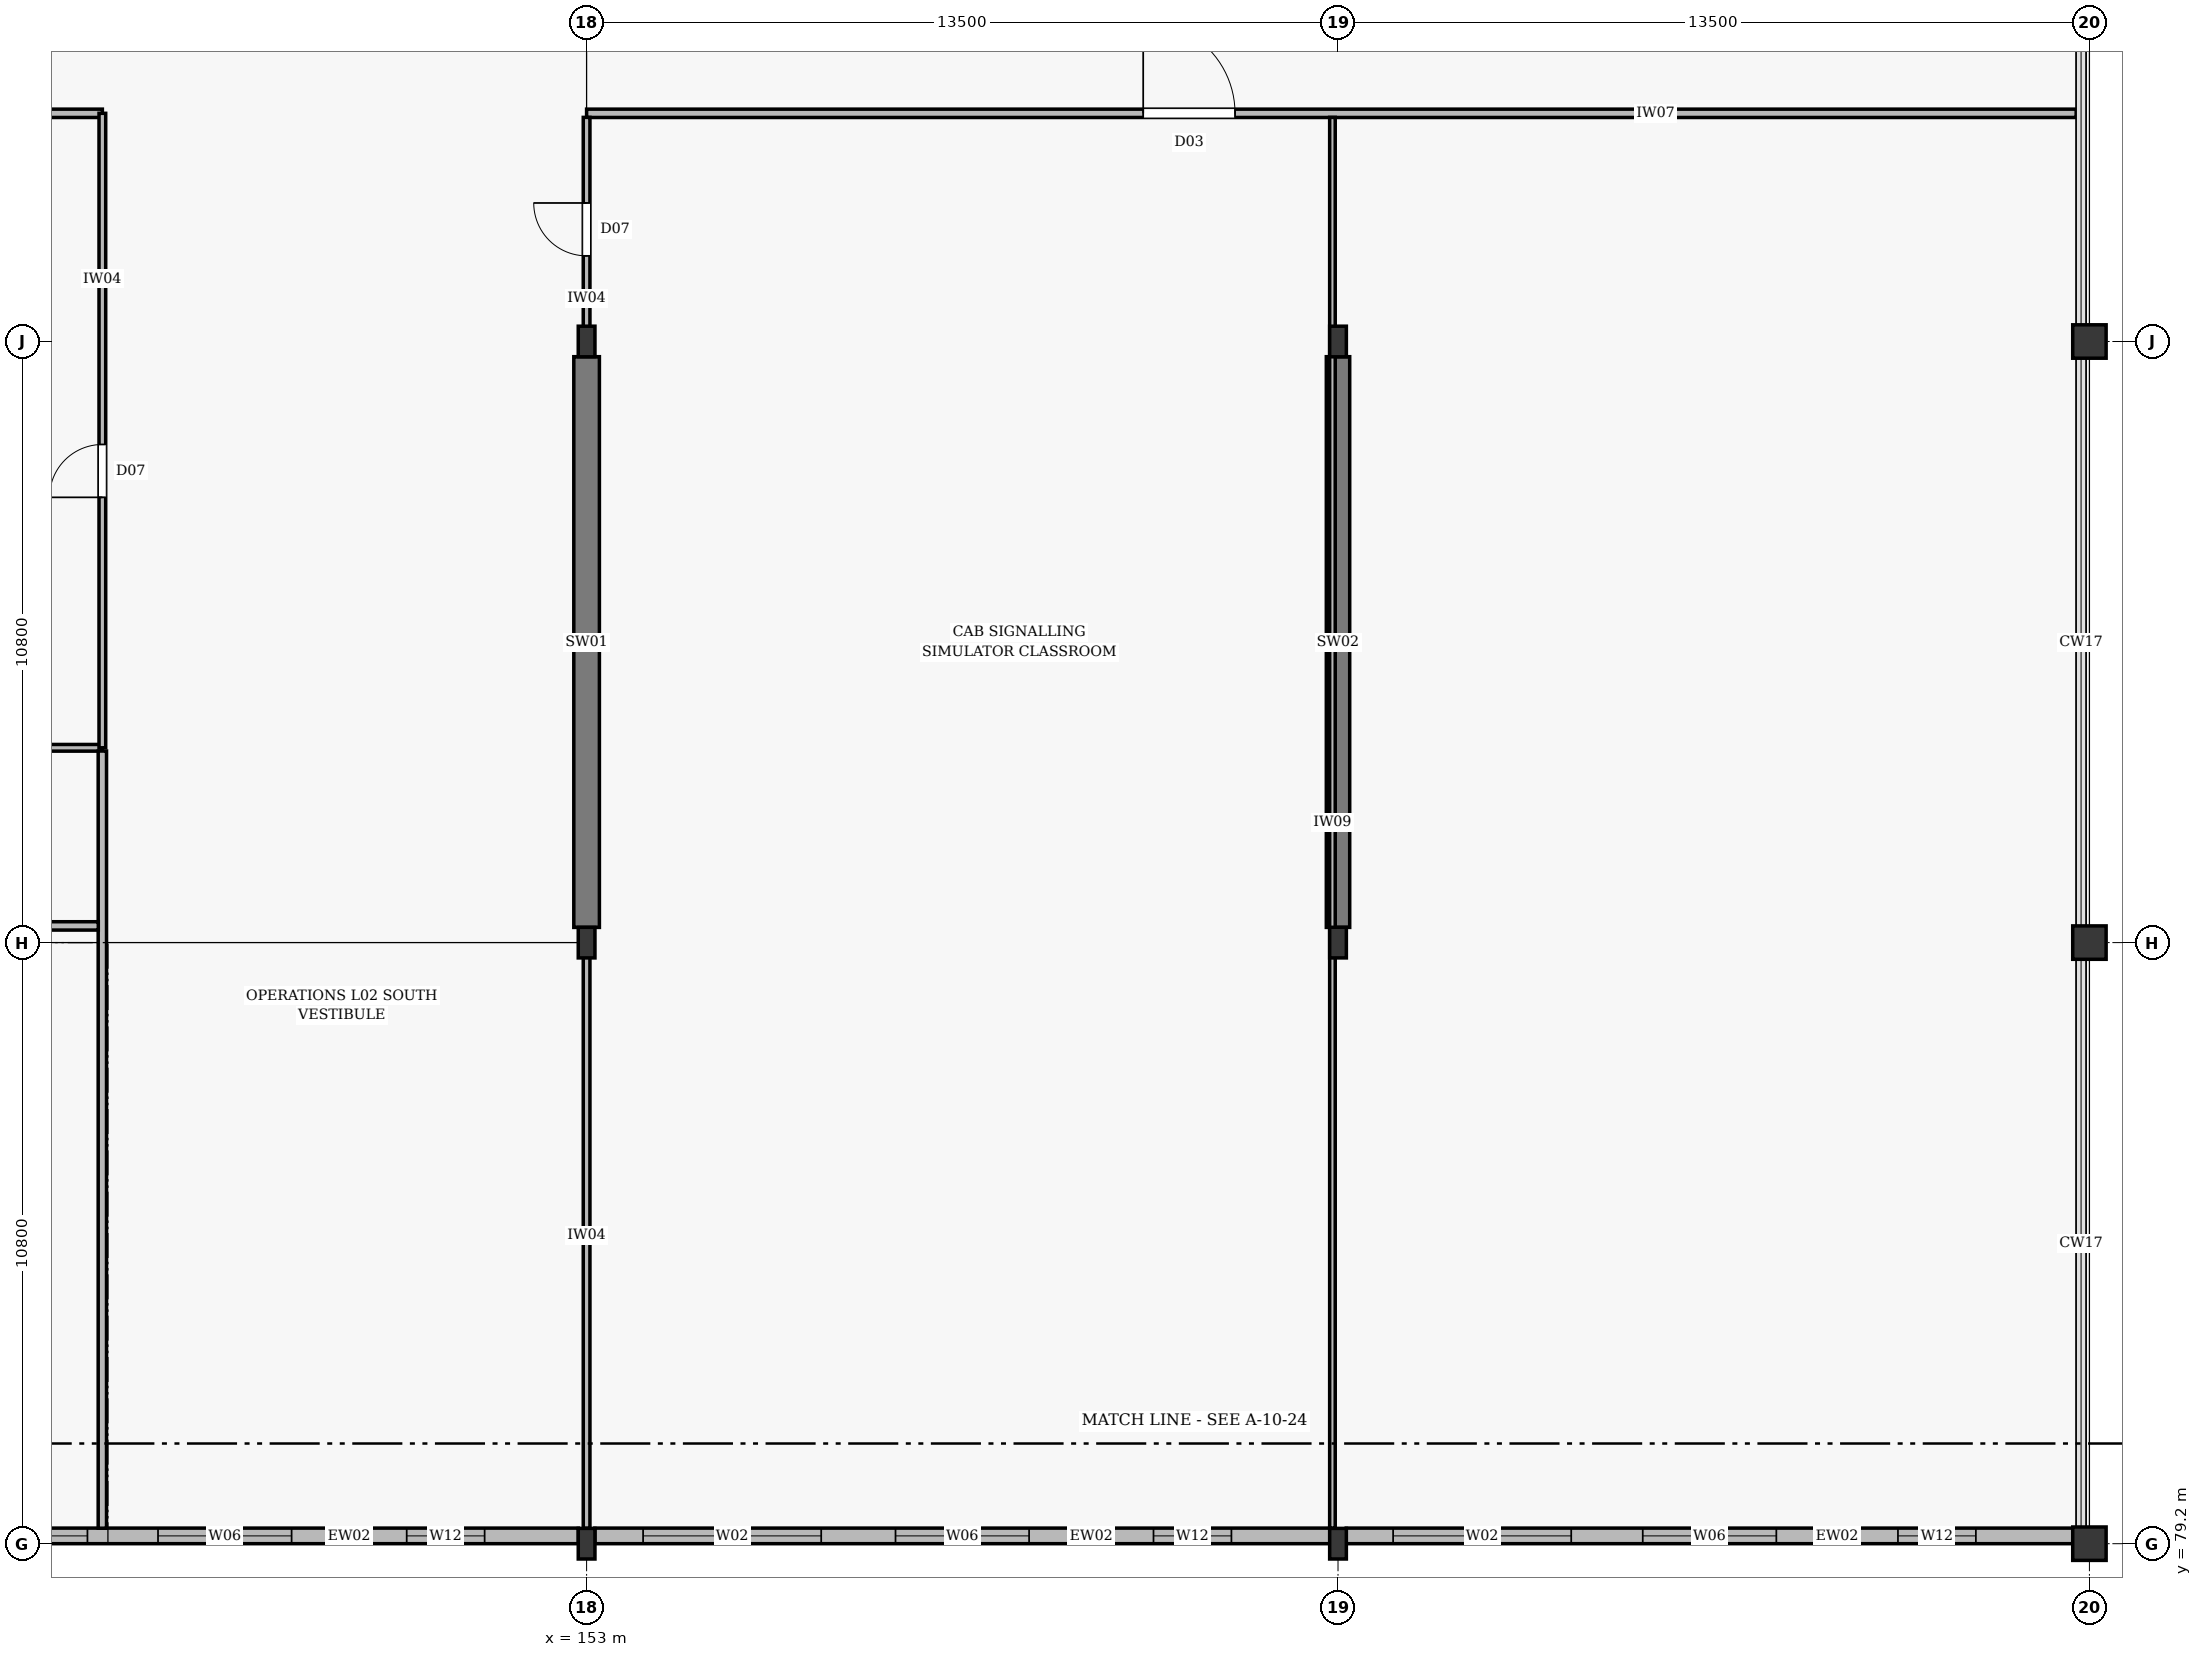
"""IFC4 building model, lengths in metres.
Left out: names, types, materials, properties, quantities, classifications, styles, units other than length and angle.
Written with IfcOpenShell. Run it as: python <this file> out.ifc"""

import sys

from ifc_helpers import new_model, si_unit, direction, frame, frame_2d, origin, origin_2d, place, context, subcontext, project, spatial, rectangle, i_section, extrude, element, fill, save


model = new_model("IFC4")
c1 = context("Model", 3, precision=1e-05, world=origin(), true_north=direction((0.0, 1.0)))
c2 = subcontext(c1, "Body", "Model", "MODEL_VIEW")
j1 = project(units=[si_unit("LENGTHUNIT", "METRE"), si_unit("PLANEANGLEUNIT", "RADIAN")], contexts=[c1])
p1 = place(None, origin())
s1 = spatial("IfcSite", under=j1, at=p1, CompositionType="ELEMENT")
p2 = place(p1, origin())
s2 = spatial("IfcBuilding", under=s1, at=p2, CompositionType="ELEMENT")
p3 = place(p2, frame((0.0, 0.0, 12.6)))
s3 = spatial("IfcBuildingStorey", under=s2, at=p3, CompositionType="ELEMENT", Elevation=12.6)
for number, where, z_axis, x_axis in (
    (1, (153.0, 79.2, 0.0), (0.0, 0.0, 1.0), (1.0, 0.0, 0.0)),
    (2, (153.0, 90.0, 0.0), (0.0, 0.0, 1.0), (1.0, 0.0, 0.0)),
    (3, (153.0, 100.8, 0.0), (0.0, 0.0, 1.0), (1.0, 0.0, 0.0)),
    (4, (166.5, 79.2, 0.0), (0.0, 0.0, 1.0), (1.0, 0.0, 0.0)),
    (5, (166.5, 90.0, 0.0), (0.0, 0.0, 1.0), (1.0, 0.0, 0.0)),
    (6, (166.5, 100.8, 0.0), (0.0, 0.0, 1.0), (1.0, 0.0, 0.0)),
):
    element("IfcColumn", number, at=place(p3, frame(where, z_axis=z_axis, x_axis=x_axis)), inside=s3, PredefinedType="COLUMN", context=c2, shape_type="SweptSolid", body=[
        extrude(i_section(OverallWidth=0.3, OverallDepth=0.55, WebThickness=0.015, FlangeThickness=0.029, at=origin_2d()), origin(), (0.0, 0.0, 1.0), 4.8),
    ])
for number, where, z_axis, x_axis in (
    (7, (180.0, 79.2, 0.0), (0.0, 0.0, 1.0), (1.0, 0.0, 0.0)),
    (8, (180.0, 90.0, 0.0), (0.0, 0.0, 1.0), (1.0, 0.0, 0.0)),
    (9, (180.0, 100.8, 0.0), (0.0, 0.0, 1.0), (1.0, 0.0, 0.0)),
):
    element("IfcColumn", number, at=place(p3, frame(where, z_axis=z_axis, x_axis=x_axis)), inside=s3, PredefinedType="COLUMN", context=c2, shape_type="SweptSolid", body=[
        extrude(rectangle(XDim=0.6, YDim=0.6, at=origin_2d()), origin(), (0.0, 0.0, 1.0), 4.8),
    ])
p4 = place(p3, frame((153.0, 90.273, 0.0), z_axis=(0.0, 0.0, 1.0), x_axis=(0.0, 1.0, 0.0)))
e10 = element("IfcWall", 10, at=p4, inside=s3, PredefinedType="SHEAR", context=c2, shape_type="SweptSolid", body=[
    extrude(rectangle(XDim=10.254, YDim=0.46, at=frame_2d((5.127, 0.0))), origin(), (0.0, 0.0, 1.0), 4.55),
])
p5 = place(p3, frame((166.5, 90.273, 0.0), z_axis=(0.0, 0.0, 1.0), x_axis=(0.0, 1.0, 0.0)))
e11 = element("IfcWall", 11, at=p5, inside=s3, PredefinedType="SHEAR", context=c2, shape_type="SweptSolid", body=[
    extrude(rectangle(XDim=10.254, YDim=0.42, at=frame_2d((5.127, 0.0))), origin(), (0.0, 0.0, 1.0), 4.55),
])
p6 = place(p3, frame((140.148, 79.34, 0.0), z_axis=(0.0, 0.0, 1.0), x_axis=(1.0, 0.0, 0.0)))
e12 = element("IfcWall", 12, at=p6, inside=s3, PredefinedType="STANDARD", context=c2, shape_type="SweptSolid", body=[
    extrude(rectangle(XDim=12.704, YDim=0.28, at=frame_2d((6.352, 0.0))), origin(), (0.0, 0.0, 1.0), 3.9),
])
p7 = place(p6, frame((0.684, 0.0, 0.75)))
e13 = element("IfcOpeningElement", 13, at=p7, cuts=e12, PredefinedType="OPENING", context=c2, shape_type="SweptSolid", body=[
    extrude(rectangle(XDim=3.2, YDim=2.8, at=frame_2d((1.6, 1.4))), frame((0.0, 0.152, 0.0), z_axis=(0.0, -1.0, 0.0), x_axis=(1.0, 0.0, 0.0)), (0.0, 0.0, 1.0), 0.304),
])
p8 = place(p6, frame((5.152, 0.0, 0.75)))
e14 = element("IfcOpeningElement", 14, at=p8, cuts=e12, PredefinedType="OPENING", context=c2, shape_type="SweptSolid", body=[
    extrude(rectangle(XDim=2.4, YDim=2.4, at=frame_2d((1.2, 1.2))), frame((0.0, 0.152, 0.0), z_axis=(0.0, -1.0, 0.0), x_axis=(1.0, 0.0, 0.0)), (0.0, 0.0, 1.0), 0.304),
])
p9 = place(p6, frame((9.62, 0.0, 1.05)))
e15 = element("IfcOpeningElement", 15, at=p9, cuts=e12, PredefinedType="OPENING", context=c2, shape_type="SweptSolid", body=[
    extrude(rectangle(XDim=1.4, YDim=1.8, at=frame_2d((0.7, 0.9))), frame((0.0, 0.152, 0.0), z_axis=(0.0, -1.0, 0.0), x_axis=(1.0, 0.0, 0.0)), (0.0, 0.0, 1.0), 0.304),
])
p10 = place(p3, frame((153.148, 79.34, 0.0), z_axis=(0.0, 0.0, 1.0), x_axis=(1.0, 0.0, 0.0)))
e16 = element("IfcWall", 16, at=p10, inside=s3, PredefinedType="STANDARD", context=c2, shape_type="SweptSolid", body=[
    extrude(rectangle(XDim=13.204, YDim=0.28, at=frame_2d((6.602, 0.0))), origin(), (0.0, 0.0, 1.0), 3.9),
])
p11 = place(p10, frame((0.867, 0.0, 0.75)))
e17 = element("IfcOpeningElement", 17, at=p11, cuts=e16, PredefinedType="OPENING", context=c2, shape_type="SweptSolid", body=[
    extrude(rectangle(XDim=3.2, YDim=2.8, at=frame_2d((1.6, 1.4))), frame((0.0, 0.152, 0.0), z_axis=(0.0, -1.0, 0.0), x_axis=(1.0, 0.0, 0.0)), (0.0, 0.0, 1.0), 0.304),
])
p12 = place(p10, frame((5.402, 0.0, 0.75)))
e18 = element("IfcOpeningElement", 18, at=p12, cuts=e16, PredefinedType="OPENING", context=c2, shape_type="SweptSolid", body=[
    extrude(rectangle(XDim=2.4, YDim=2.4, at=frame_2d((1.2, 1.2))), frame((0.0, 0.152, 0.0), z_axis=(0.0, -1.0, 0.0), x_axis=(1.0, 0.0, 0.0)), (0.0, 0.0, 1.0), 0.304),
])
p13 = place(p10, frame((10.037, 0.0, 1.05)))
e19 = element("IfcOpeningElement", 19, at=p13, cuts=e16, PredefinedType="OPENING", context=c2, shape_type="SweptSolid", body=[
    extrude(rectangle(XDim=1.4, YDim=1.8, at=frame_2d((0.7, 0.9))), frame((0.0, 0.152, 0.0), z_axis=(0.0, -1.0, 0.0), x_axis=(1.0, 0.0, 0.0)), (0.0, 0.0, 1.0), 0.304),
])
p14 = place(p3, frame((166.648, 79.34, 0.0), z_axis=(0.0, 0.0, 1.0), x_axis=(1.0, 0.0, 0.0)))
e20 = element("IfcWall", 20, at=p14, inside=s3, PredefinedType="STANDARD", context=c2, shape_type="SweptSolid", body=[
    extrude(rectangle(XDim=13.054, YDim=0.28, at=frame_2d((6.527, 0.0))), origin(), (0.0, 0.0, 1.0), 3.9),
])
p15 = place(p14, frame((0.842, 0.0, 0.75)))
e21 = element("IfcOpeningElement", 21, at=p15, cuts=e20, PredefinedType="OPENING", context=c2, shape_type="SweptSolid", body=[
    extrude(rectangle(XDim=3.2, YDim=2.8, at=frame_2d((1.6, 1.4))), frame((0.0, 0.152, 0.0), z_axis=(0.0, -1.0, 0.0), x_axis=(1.0, 0.0, 0.0)), (0.0, 0.0, 1.0), 0.304),
])
p16 = place(p14, frame((5.327, 0.0, 0.75)))
e22 = element("IfcOpeningElement", 22, at=p16, cuts=e20, PredefinedType="OPENING", context=c2, shape_type="SweptSolid", body=[
    extrude(rectangle(XDim=2.4, YDim=2.4, at=frame_2d((1.2, 1.2))), frame((0.0, 0.152, 0.0), z_axis=(0.0, -1.0, 0.0), x_axis=(1.0, 0.0, 0.0)), (0.0, 0.0, 1.0), 0.304),
])
p17 = place(p14, frame((9.912, 0.0, 1.05)))
e23 = element("IfcOpeningElement", 23, at=p17, cuts=e20, PredefinedType="OPENING", context=c2, shape_type="SweptSolid", body=[
    extrude(rectangle(XDim=1.4, YDim=1.8, at=frame_2d((0.7, 0.9))), frame((0.0, 0.152, 0.0), z_axis=(0.0, -1.0, 0.0), x_axis=(1.0, 0.0, 0.0)), (0.0, 0.0, 1.0), 0.304),
])
p18 = place(p3, frame((118.338, 104.9, 0.0), z_axis=(0.0, 0.0, 1.0), x_axis=(1.0, 0.0, 0.0)))
e24 = element("IfcWall", 24, at=p18, inside=s3, PredefinedType="PARTITIONING", context=c2, shape_type="SweptSolid", body=[
    extrude(rectangle(XDim=25.962, YDim=0.15, at=frame_2d((12.981, 0.0))), origin(), (0.0, 0.0, 1.0), 4.09),
])
p19 = place(p18, frame((10.262, 0.0, 0.005)))
e25 = element("IfcOpeningElement", 25, at=p19, cuts=e24, PredefinedType="OPENING", context=c2, shape_type="SweptSolid", body=[
    extrude(rectangle(XDim=1.1, YDim=2.1, at=frame_2d((0.55, 1.05))), frame((0.0, 0.087, 0.0), z_axis=(0.0, -1.0, 0.0), x_axis=(1.0, 0.0, 0.0)), (0.0, 0.0, 1.0), 0.174),
])
p20 = place(p3, frame((153.0, 104.9, 0.0), z_axis=(0.0, 0.0, 1.0), x_axis=(1.0, 0.0, 0.0)))
e26 = element("IfcWall", 26, at=p20, inside=s3, PredefinedType="PARTITIONING", context=c2, shape_type="SweptSolid", body=[
    extrude(rectangle(XDim=26.762, YDim=0.15, at=frame_2d((13.381, 0.0))), origin(), (0.0, 0.0, 1.0), 4.09),
])
p21 = place(p20, frame((10.0, 0.0, 0.005)))
e27 = element("IfcOpeningElement", 27, at=p21, cuts=e26, PredefinedType="OPENING", context=c2, shape_type="SweptSolid", body=[
    extrude(rectangle(XDim=1.65, YDim=2.2, at=frame_2d((0.825, 1.1))), frame((0.0, 0.087, 0.0), z_axis=(0.0, -1.0, 0.0), x_axis=(1.0, 0.0, 0.0)), (0.0, 0.0, 1.0), 0.174),
])
p22 = place(p3, frame((128.6, 93.5, 0.0), z_axis=(0.0, 0.0, 1.0), x_axis=(1.0, 0.0, 0.0)))
e28 = element("IfcWall", 28, at=p22, inside=s3, PredefinedType="PARTITIONING", context=c2, shape_type="SweptSolid", body=[
    extrude(rectangle(XDim=15.7, YDim=0.12, at=frame_2d((7.85, 0.0))), origin(), (0.0, 0.0, 1.0), 4.09),
])
p23 = place(p3, frame((144.3, 93.5, 0.0), z_axis=(0.0, 0.0, 1.0), x_axis=(0.0, 1.0, 0.0)))
e29 = element("IfcWall", 29, at=p23, inside=s3, PredefinedType="PARTITIONING", context=c2, shape_type="SweptSolid", body=[
    extrude(rectangle(XDim=11.4, YDim=0.12, at=frame_2d((5.7, 0.0))), origin(), (0.0, 0.0, 1.0), 3.99),
])
p24 = place(p23, frame((4.5, 0.0, 0.005)))
e30 = element("IfcOpeningElement", 30, at=p24, cuts=e29, PredefinedType="OPENING", context=c2, shape_type="SweptSolid", body=[
    extrude(rectangle(XDim=0.95, YDim=2.1, at=frame_2d((0.475, 1.05))), frame((0.0, 0.072, 0.0), z_axis=(0.0, -1.0, 0.0), x_axis=(1.0, 0.0, 0.0)), (0.0, 0.0, 1.0), 0.144),
])
p25 = place(p3, frame((144.3, 79.478, 0.0), z_axis=(0.0, 0.0, 1.0), x_axis=(0.0, 1.0, 0.0)))
e31 = element("IfcWall", 31, at=p25, inside=s3, PredefinedType="PARTITIONING", context=c2, shape_type="SweptSolid", body=[
    extrude(rectangle(XDim=13.964, YDim=0.15, at=frame_2d((6.982, 0.0))), origin(), (0.0, 0.0, 1.0), 3.99),
])
p26 = place(p3, frame((153.0, 79.478, 0.0), z_axis=(0.0, 0.0, 1.0), x_axis=(0.0, 1.0, 0.0)))
e32 = element("IfcWall", 32, at=p26, inside=s3, PredefinedType="PARTITIONING", context=c2, shape_type="SweptSolid", body=[
    extrude(rectangle(XDim=10.522, YDim=0.12, at=frame_2d((5.261, 0.0))), origin(), (0.0, 0.0, 1.0), 3.99),
])
p27 = place(p3, frame((153.0, 100.8, 0.0), z_axis=(0.0, 0.0, 1.0), x_axis=(0.0, 1.0, 0.0)))
e33 = element("IfcWall", 33, at=p27, inside=s3, PredefinedType="PARTITIONING", context=c2, shape_type="SweptSolid", body=[
    extrude(rectangle(XDim=4.027, YDim=0.12, at=frame_2d((2.013, 0.0))), origin(), (0.0, 0.0, 1.0), 3.99),
])
p28 = place(p27, frame((1.539, 0.0, 0.005)))
e34 = element("IfcOpeningElement", 34, at=p28, cuts=e33, PredefinedType="OPENING", context=c2, shape_type="SweptSolid", body=[
    extrude(rectangle(XDim=0.95, YDim=2.1, at=frame_2d((0.475, 1.05))), frame((0.0, 0.072, 0.0), z_axis=(0.0, -1.0, 0.0), x_axis=(1.0, 0.0, 0.0)), (0.0, 0.0, 1.0), 0.144),
])
p29 = place(p3, frame((128.6, 90.3, 0.0), z_axis=(0.0, 0.0, 1.0), x_axis=(1.0, 0.0, 0.0)))
e35 = element("IfcWall", 35, at=p29, inside=s3, PredefinedType="PARTITIONING", context=c2, shape_type="SweptSolid", body=[
    extrude(rectangle(XDim=15.627, YDim=0.15, at=frame_2d((7.813, 0.0))), origin(), (0.0, 0.0, 1.0), 3.99),
])
p30 = place(p29, frame((2.2, 0.0, 0.005)))
e36 = element("IfcOpeningElement", 36, at=p30, cuts=e35, PredefinedType="OPENING", context=c2, shape_type="SweptSolid", body=[
    extrude(rectangle(XDim=0.92, YDim=2.12, at=frame_2d((0.46, 1.06))), frame((0.0, 0.087, 0.0), z_axis=(0.0, -1.0, 0.0), x_axis=(1.0, 0.0, 0.0)), (0.0, 0.0, 1.0), 0.174),
])
p31 = place(p29, frame((7.2, 0.0, 0.005)))
e37 = element("IfcOpeningElement", 37, at=p31, cuts=e35, PredefinedType="OPENING", context=c2, shape_type="SweptSolid", body=[
    extrude(rectangle(XDim=1.05, YDim=2.15, at=frame_2d((0.525, 1.075))), frame((0.0, 0.087, 0.0), z_axis=(0.0, -1.0, 0.0), x_axis=(1.0, 0.0, 0.0)), (0.0, 0.0, 1.0), 0.174),
])
p32 = place(p3, frame((166.4, 79.478, 0.0), z_axis=(0.0, 0.0, 1.0), x_axis=(0.0, 1.0, 0.0)))
e38 = element("IfcWall", 38, at=p32, inside=s3, PredefinedType="MOVABLE", context=c2, shape_type="SweptSolid", body=[
    extrude(rectangle(XDim=25.349, YDim=0.1, at=frame_2d((12.674, 0.0))), origin(), (0.0, 0.0, 1.0), 3.99),
])
p33 = place(p7, origin())
e39 = element("IfcWindow", 39, at=p33, inside=s3, PartitioningType="DOUBLE_PANEL_VERTICAL", PredefinedType="WINDOW", context=c2, shape_type="SweptSolid", body=[
    extrude(rectangle(XDim=3.2, YDim=2.8, at=frame_2d((1.6, 1.4))), frame((0.0, 0.03, 0.0), z_axis=(0.0, -1.0, 0.0), x_axis=(1.0, 0.0, 0.0)), (0.0, 0.0, 1.0), 0.06),
])
fill(e13, e39)
p34 = place(p8, origin())
e40 = element("IfcWindow", 40, at=p34, inside=s3, PartitioningType="DOUBLE_PANEL_VERTICAL", PredefinedType="WINDOW", context=c2, shape_type="SweptSolid", body=[
    extrude(rectangle(XDim=2.4, YDim=2.4, at=frame_2d((1.2, 1.2))), frame((0.0, 0.03, 0.0), z_axis=(0.0, -1.0, 0.0), x_axis=(1.0, 0.0, 0.0)), (0.0, 0.0, 1.0), 0.06),
])
fill(e14, e40)
p35 = place(p9, origin())
e41 = element("IfcWindow", 41, at=p35, inside=s3, PartitioningType="DOUBLE_PANEL_VERTICAL", PredefinedType="WINDOW", context=c2, shape_type="SweptSolid", body=[
    extrude(rectangle(XDim=1.4, YDim=1.8, at=frame_2d((0.7, 0.9))), frame((0.0, 0.03, 0.0), z_axis=(0.0, -1.0, 0.0), x_axis=(1.0, 0.0, 0.0)), (0.0, 0.0, 1.0), 0.06),
])
fill(e15, e41)
p36 = place(p11, origin())
e42 = element("IfcWindow", 42, at=p36, inside=s3, PartitioningType="DOUBLE_PANEL_VERTICAL", PredefinedType="WINDOW", context=c2, shape_type="SweptSolid", body=[
    extrude(rectangle(XDim=3.2, YDim=2.8, at=frame_2d((1.6, 1.4))), frame((0.0, 0.03, 0.0), z_axis=(0.0, -1.0, 0.0), x_axis=(1.0, 0.0, 0.0)), (0.0, 0.0, 1.0), 0.06),
])
fill(e17, e42)
p37 = place(p12, origin())
e43 = element("IfcWindow", 43, at=p37, inside=s3, PartitioningType="DOUBLE_PANEL_VERTICAL", PredefinedType="WINDOW", context=c2, shape_type="SweptSolid", body=[
    extrude(rectangle(XDim=2.4, YDim=2.4, at=frame_2d((1.2, 1.2))), frame((0.0, 0.03, 0.0), z_axis=(0.0, -1.0, 0.0), x_axis=(1.0, 0.0, 0.0)), (0.0, 0.0, 1.0), 0.06),
])
fill(e18, e43)
p38 = place(p13, origin())
e44 = element("IfcWindow", 44, at=p38, inside=s3, PartitioningType="DOUBLE_PANEL_VERTICAL", PredefinedType="WINDOW", context=c2, shape_type="SweptSolid", body=[
    extrude(rectangle(XDim=1.4, YDim=1.8, at=frame_2d((0.7, 0.9))), frame((0.0, 0.03, 0.0), z_axis=(0.0, -1.0, 0.0), x_axis=(1.0, 0.0, 0.0)), (0.0, 0.0, 1.0), 0.06),
])
fill(e19, e44)
p39 = place(p15, origin())
e45 = element("IfcWindow", 45, at=p39, inside=s3, PartitioningType="DOUBLE_PANEL_VERTICAL", PredefinedType="WINDOW", context=c2, shape_type="SweptSolid", body=[
    extrude(rectangle(XDim=3.2, YDim=2.8, at=frame_2d((1.6, 1.4))), frame((0.0, 0.03, 0.0), z_axis=(0.0, -1.0, 0.0), x_axis=(1.0, 0.0, 0.0)), (0.0, 0.0, 1.0), 0.06),
])
fill(e21, e45)
p40 = place(p16, origin())
e46 = element("IfcWindow", 46, at=p40, inside=s3, PartitioningType="DOUBLE_PANEL_VERTICAL", PredefinedType="WINDOW", context=c2, shape_type="SweptSolid", body=[
    extrude(rectangle(XDim=2.4, YDim=2.4, at=frame_2d((1.2, 1.2))), frame((0.0, 0.03, 0.0), z_axis=(0.0, -1.0, 0.0), x_axis=(1.0, 0.0, 0.0)), (0.0, 0.0, 1.0), 0.06),
])
fill(e22, e46)
p41 = place(p17, origin())
e47 = element("IfcWindow", 47, at=p41, inside=s3, PartitioningType="DOUBLE_PANEL_VERTICAL", PredefinedType="WINDOW", context=c2, shape_type="SweptSolid", body=[
    extrude(rectangle(XDim=1.4, YDim=1.8, at=frame_2d((0.7, 0.9))), frame((0.0, 0.03, 0.0), z_axis=(0.0, -1.0, 0.0), x_axis=(1.0, 0.0, 0.0)), (0.0, 0.0, 1.0), 0.06),
])
fill(e23, e47)
p42 = place(p21, origin())
e48 = element("IfcDoor", 48, at=p42, inside=s3, OperationType="DOUBLE_DOOR_SINGLE_SWING", PredefinedType="DOOR", context=c2, shape_type="SweptSolid", body=[
    extrude(rectangle(XDim=1.65, YDim=2.2, at=frame_2d((0.825, 1.1))), frame((0.0, 0.025, 0.0), z_axis=(0.0, -1.0, 0.0), x_axis=(1.0, 0.0, 0.0)), (0.0, 0.0, 1.0), 0.05),
])
fill(e27, e48)
p43 = place(p24, origin())
e49 = element("IfcDoor", 49, at=p43, inside=s3, OperationType="SINGLE_SWING_LEFT", PredefinedType="DOOR", context=c2, shape_type="SweptSolid", body=[
    extrude(rectangle(XDim=0.95, YDim=2.1, at=frame_2d((0.475, 1.05))), frame((0.0, 0.025, 0.0), z_axis=(0.0, -1.0, 0.0), x_axis=(1.0, 0.0, 0.0)), (0.0, 0.0, 1.0), 0.05),
])
fill(e30, e49)
p44 = place(p28, origin())
e50 = element("IfcDoor", 50, at=p44, inside=s3, OperationType="SINGLE_SWING_RIGHT", PredefinedType="DOOR", context=c2, shape_type="SweptSolid", body=[
    extrude(rectangle(XDim=0.95, YDim=2.1, at=frame_2d((0.475, 1.05))), frame((0.0, 0.025, 0.0), z_axis=(0.0, -1.0, 0.0), x_axis=(1.0, 0.0, 0.0)), (0.0, 0.0, 1.0), 0.05),
])
fill(e34, e50)
save(model, sys.argv[1])
